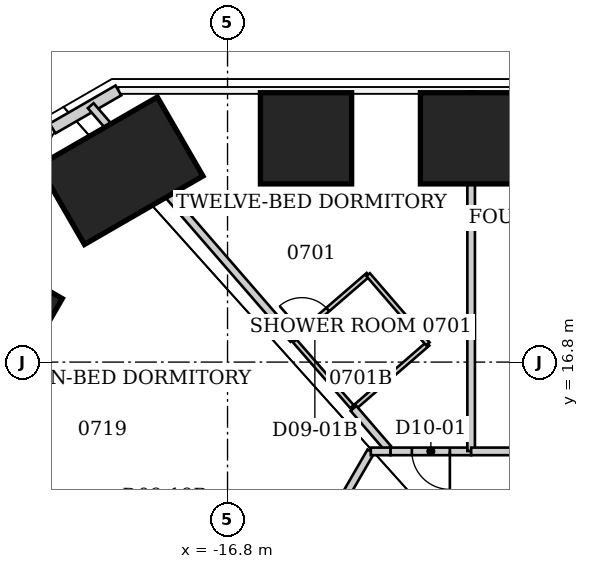
"""IFC4 building model, lengths in metres.
Left out: names, types, materials, properties, quantities, classifications, styles, units other than length and angle.
Written with IfcOpenShell. Run it as: python <this file> out.ifc"""

import sys

from ifc_helpers import new_model, si_unit, direction, frame, frame_2d, origin, origin_2d, place, context, subcontext, project, spatial, rectangle, extrude, element, fill, save


model = new_model("IFC4")
c1 = context("Model", 3, precision=1e-05, world=origin(), true_north=direction((0.0, 1.0)))
c2 = subcontext(c1, "Body", "Model", "MODEL_VIEW")
j1 = project(units=[si_unit("LENGTHUNIT", "METRE"), si_unit("PLANEANGLEUNIT", "RADIAN")], contexts=[c1])
p1 = place(None, origin())
s1 = spatial("IfcSite", under=j1, at=p1, CompositionType="ELEMENT")
p2 = place(p1, origin())
s2 = spatial("IfcBuilding", under=s1, at=p2, CompositionType="ELEMENT")
p3 = place(p2, frame((0.0, 0.0, 34.4)))
s3 = spatial("IfcBuildingStorey", under=s2, at=p3, CompositionType="ELEMENT", Elevation=34.4)
for number, where, z_axis, x_axis in (
    (1, (-14.735, 22.689, 0.0), (0.0, 0.0, 1.0), (0.0, 1.0, 0.0)),
    (2, (-10.525, 22.689, 0.0), (0.0, 0.0, 1.0), (0.0, 1.0, 0.0)),
    (3, (-22.788, 18.032, 0.0), (0.0, 0.0, 1.0), (-0.866, 0.5, 0.0)),
):
    element("IfcColumn", number, at=place(p3, frame(where, z_axis=z_axis, x_axis=x_axis)), inside=s3, PredefinedType="COLUMN", context=c2, shape_type="SweptSolid", body=[
        extrude(rectangle(XDim=2.4, YDim=2.4, at=origin_2d()), origin(), (0.0, 0.0, 1.0), 3.8),
    ])
p4 = place(p3, frame((-19.606, 21.835, 0.0), z_axis=(0.0, 0.0, 1.0), x_axis=(-0.5, 0.866025403784, 0.0)))
e4 = element("IfcColumn", 4, at=p4, inside=s3, PredefinedType="COLUMN", context=c2, shape_type="SweptSolid", body=[
    extrude(rectangle(XDim=2.4, YDim=3.6, at=origin_2d()), origin(), (0.0, 0.0, 1.0), 3.8),
])
p5 = place(p3, frame((-21.404, 22.949, 0.0), z_axis=(0.0, 0.0, 1.0), x_axis=(0.866010750942, 0.50002537861, 0.0)))
e5 = element("IfcWall", 5, at=p5, inside=s3, PredefinedType="SOLIDWALL", context=c2, shape_type="SweptSolid", body=[
    extrude(rectangle(XDim=2.0, YDim=0.3, at=frame_2d((1.0, 0.0))), origin(), (0.0, 0.0, 1.0), 3.64),
])
p6 = place(p3, frame((-25.886, 14.95, 0.0), z_axis=(0.0, 0.0, 1.0), x_axis=(0.866018495177, -0.500011965869, 0.0)))
e6 = element("IfcWall", 6, at=p6, inside=s3, PredefinedType="PARTITIONING", context=c2, shape_type="SweptSolid", body=[
    extrude(rectangle(XDim=8.76, YDim=0.2, at=frame_2d((4.38, 0.0))), origin(), (0.0, 0.0, 1.0), 2.86),
])
p7 = place(p3, frame((-20.4, 23.547, 0.0), z_axis=(0.0, 0.0, 1.0), x_axis=(0.655107582677, -0.755535608108, 0.0)))
e7 = element("IfcWall", 7, at=p7, inside=s3, PredefinedType="PARTITIONING", context=c2, shape_type="SweptSolid", body=[
    extrude(rectangle(XDim=8.136, YDim=0.2, at=frame_2d((4.068, 0.0))), origin(), (0.0, 0.0, 1.0), 3.64),
])
p8 = place(p3, frame((-16.031, 9.261, 0.0), z_axis=(0.0, 0.0, 1.0), x_axis=(0.500702302597, 0.865619549325, 0.0)))
e8 = element("IfcWall", 8, at=p8, inside=s3, PredefinedType="PARTITIONING", context=c2, shape_type="SweptSolid", body=[
    extrude(rectangle(XDim=5.995, YDim=0.2, at=frame_2d((2.997, 0.0))), origin(), (0.0, 0.0, 1.0), 3.64),
])
p9 = place(p8, frame((2.697, 0.0, 0.0)))
e9 = element("IfcOpeningElement", 9, at=p9, cuts=e8, PredefinedType="OPENING", context=c2, shape_type="SweptSolid", body=[
    extrude(rectangle(XDim=1.0, YDim=2.13, at=frame_2d((0.5, 1.065))), frame((0.0, 0.1, 0.0), z_axis=(0.0, -1.0, 0.0), x_axis=(1.0, 0.0, 0.0)), (0.0, 0.0, 1.0), 0.2),
])
p10 = place(p3, frame((-15.07, 17.4, 0.0), z_axis=(0.0, 0.0, 1.0), x_axis=(0.657083550002, -0.753817755374, 0.0)))
e10 = element("IfcWall", 10, at=p10, inside=s3, PredefinedType="PARTITIONING", context=c2, shape_type="SweptSolid", body=[
    extrude(rectangle(XDim=2.41, YDim=0.12, at=frame_2d((1.205, 0.0))), origin(), (0.0, 0.0, 1.0), 3.64),
])
p11 = place(p3, frame((-13.49, 15.58, 0.0), z_axis=(0.0, 0.0, 1.0), x_axis=(0.755437535555, 0.655220672655, 0.0)))
e11 = element("IfcWall", 11, at=p11, inside=s3, PredefinedType="PARTITIONING", context=c2, shape_type="SweptSolid", body=[
    extrude(rectangle(XDim=2.594, YDim=0.12, at=frame_2d((1.297, 0.0))), origin(), (0.0, 0.0, 1.0), 3.64),
])
p12 = place(p3, frame((-13.486, 15.583, 0.0), z_axis=(0.0, 0.0, 1.0), x_axis=(0.652755533609, -0.75756861956, 0.0)))
e12 = element("IfcWall", 12, at=p12, inside=s3, PredefinedType="PARTITIONING", context=c2, shape_type="SweptSolid", body=[
    extrude(rectangle(XDim=1.391, YDim=0.2, at=frame_2d((0.695, 0.0))), origin(), (0.0, 0.0, 1.0), 3.64),
])
p13 = place(p3, frame((-13.1, 19.1, 0.0), z_axis=(0.0, 0.0, 1.0), x_axis=(-0.757040252764, -0.65336823897, 0.0)))
e13 = element("IfcWall", 13, at=p13, inside=s3, PredefinedType="PARTITIONING", context=c2, shape_type="SweptSolid", body=[
    extrude(rectangle(XDim=2.602, YDim=0.12, at=frame_2d((1.301, 0.0))), origin(), (0.0, 0.0, 1.0), 3.64),
])
p14 = place(p13, frame((1.402, 0.0, 0.0)))
e14 = element("IfcOpeningElement", 14, at=p14, cuts=e13, PredefinedType="OPENING", context=c2, shape_type="SweptSolid", body=[
    extrude(rectangle(XDim=0.9, YDim=2.03, at=frame_2d((0.45, 1.015))), frame((0.0, 0.06, 0.0), z_axis=(0.0, -1.0, 0.0), x_axis=(1.0, 0.0, 0.0)), (0.0, 0.0, 1.0), 0.12),
])
p15 = place(p3, frame((-12.51, 14.45, 0.0), z_axis=(0.0, 0.0, 1.0), x_axis=(-1.0, 0.0, 0.0)))
e15 = element("IfcWall", 15, at=p15, inside=s3, PredefinedType="PARTITIONING", context=c2, shape_type="SweptSolid", body=[
    extrude(rectangle(XDim=0.52, YDim=0.2, at=frame_2d((0.26, 0.0))), origin(), (0.0, 0.0, 1.0), 3.64),
])
p16 = place(p3, frame((-11.53, 17.28, 0.0), z_axis=(0.0, 0.0, 1.0), x_axis=(-0.653188728136, 0.757195143563, 0.0)))
e16 = element("IfcWall", 16, at=p16, inside=s3, PredefinedType="PARTITIONING", context=c2, shape_type="SweptSolid", body=[
    extrude(rectangle(XDim=2.404, YDim=0.12, at=frame_2d((1.202, 0.0))), origin(), (0.0, 0.0, 1.0), 3.64),
])
p17 = place(p3, frame((-10.39, 14.45, 0.0), z_axis=(0.0, 0.0, 1.0), x_axis=(-1.0, 0.0, 0.0)))
e17 = element("IfcWall", 17, at=p17, inside=s3, PredefinedType="PARTITIONING", context=c2, shape_type="SweptSolid", body=[
    extrude(rectangle(XDim=2.12, YDim=0.2, at=frame_2d((1.06, 0.0))), origin(), (0.0, 0.0, 1.0), 3.64),
])
p18 = place(p17, frame((0.56, 0.0, 0.0)))
e18 = element("IfcOpeningElement", 18, at=p18, cuts=e17, PredefinedType="OPENING", context=c2, shape_type="SweptSolid", body=[
    extrude(rectangle(XDim=1.0, YDim=2.13, at=frame_2d((0.5, 1.065))), frame((0.0, 0.1, 0.0), z_axis=(0.0, -1.0, 0.0), x_axis=(1.0, 0.0, 0.0)), (0.0, 0.0, 1.0), 0.2),
])
p19 = place(p3, frame((-10.39, 23.92, 0.0), z_axis=(0.0, 0.0, 1.0), x_axis=(0.0, -1.0, 0.0)))
e19 = element("IfcWall", 19, at=p19, inside=s3, PredefinedType="PARTITIONING", context=c2, shape_type="SweptSolid", body=[
    extrude(rectangle(XDim=9.46, YDim=0.2, at=frame_2d((4.73, 0.0))), origin(), (0.0, 0.0, 1.0), 3.64),
])
p20 = place(p3, frame((-4.64, 14.45, 0.0), z_axis=(0.0, 0.0, 1.0), x_axis=(-1.0, 0.0, 0.0)))
e20 = element("IfcWall", 20, at=p20, inside=s3, PredefinedType="PARTITIONING", context=c2, shape_type="SweptSolid", body=[
    extrude(rectangle(XDim=5.75, YDim=0.2, at=frame_2d((2.875, 0.0))), origin(), (0.0, 0.0, 1.0), 3.64),
])
p21 = place(p20, frame((2.375, 0.0, 0.0)))
e21 = element("IfcOpeningElement", 21, at=p21, cuts=e20, PredefinedType="OPENING", context=c2, shape_type="SweptSolid", body=[
    extrude(rectangle(XDim=1.0, YDim=2.13, at=frame_2d((0.5, 1.065))), frame((0.0, 0.1, 0.0), z_axis=(0.0, -1.0, 0.0), x_axis=(1.0, 0.0, 0.0)), (0.0, 0.0, 1.0), 0.2),
])
p22 = place(p18, origin())
e22 = element("IfcDoor", 22, at=p22, inside=s3, OperationType="SINGLE_SWING_LEFT", PredefinedType="DOOR", context=c2, shape_type="SweptSolid", body=[
    extrude(rectangle(XDim=1.0, YDim=2.13, at=frame_2d((0.5, 1.065))), frame((0.0, 0.025, 0.0), z_axis=(0.0, -1.0, 0.0), x_axis=(1.0, 0.0, 0.0)), (0.0, 0.0, 1.0), 0.05),
])
fill(e18, e22)
p23 = place(p14, origin())
e23 = element("IfcDoor", 23, at=p23, inside=s3, OperationType="SINGLE_SWING_RIGHT", PredefinedType="DOOR", context=c2, shape_type="SweptSolid", body=[
    extrude(rectangle(XDim=0.9, YDim=2.03, at=frame_2d((0.45, 1.015))), frame((0.0, 0.025, 0.0), z_axis=(0.0, -1.0, 0.0), x_axis=(1.0, 0.0, 0.0)), (0.0, 0.0, 1.0), 0.05),
])
fill(e14, e23)
save(model, sys.argv[1])
